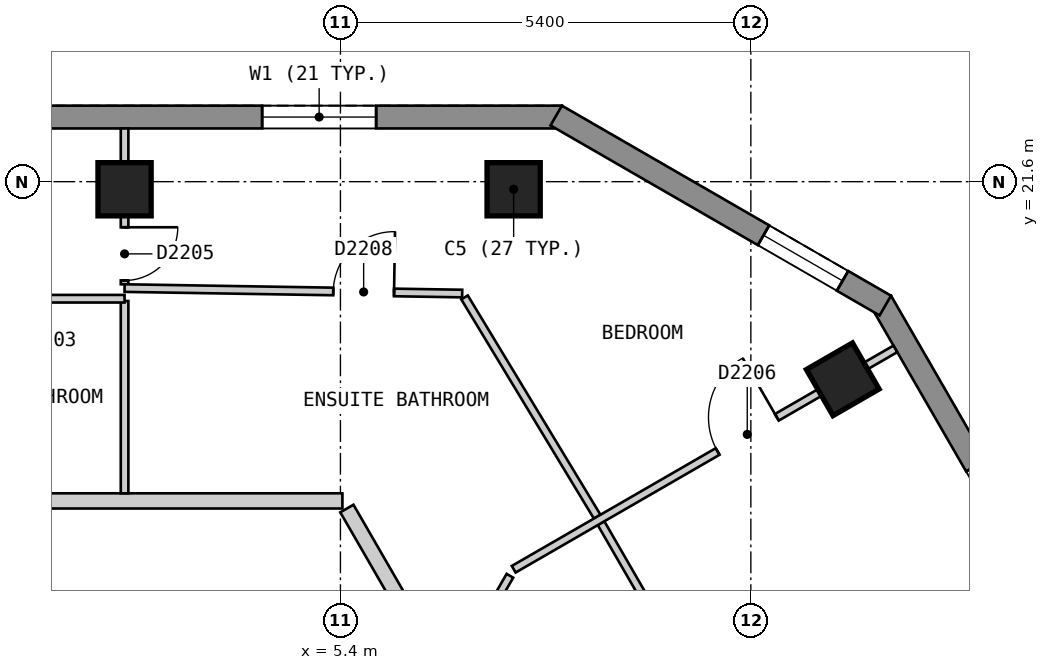
"""IFC4 building model, lengths in metres.
Left out: names, types, materials, properties, quantities, classifications, styles, units other than length and angle.
Written with IfcOpenShell. Run it as: python <this file> out.ifc"""

import sys

from ifc_helpers import new_model, si_unit, direction, frame, frame_2d, origin, origin_2d, place, context, subcontext, project, spatial, polyline, rectangle, outline, extrude, element, fill, save


model = new_model("IFC4")
c1 = context("Model", 3, precision=1e-05, world=origin(), true_north=direction((0.0, 1.0)))
c2 = subcontext(c1, "Body", "Model", "MODEL_VIEW")
j1 = project(units=[si_unit("LENGTHUNIT", "METRE"), si_unit("PLANEANGLEUNIT", "RADIAN")], contexts=[c1])
p1 = place(None, origin())
s1 = spatial("IfcSite", under=j1, at=p1, CompositionType="ELEMENT")
p2 = place(p1, origin())
s2 = spatial("IfcBuilding", under=s1, at=p2, CompositionType="ELEMENT")
p3 = place(p2, frame((0.0, 0.0, 235.8)))
s3 = spatial("IfcBuildingStorey", under=s2, at=p3, CompositionType="ELEMENT", Elevation=235.8)
for number, where, z_axis, x_axis in (
    (1, (7.679, 21.5, 0.0), (0.0, 0.0, 1.0), (-1.0, 0.0, 0.0)),
    (2, (2.56, 21.5, 0.0), (0.0, 0.0, 1.0), (-1.0, 0.0, 0.0)),
    (3, (12.009, 19.0, 0.0), (0.0, 0.0, 1.0), (-0.5, 0.866, 0.0)),
):
    element("IfcColumn", number, at=place(p3, frame(where, z_axis=z_axis, x_axis=x_axis)), inside=s3, PredefinedType="COLUMN", context=c2, shape_type="SweptSolid", body=[
        extrude(rectangle(XDim=0.7, YDim=0.7, at=origin_2d()), origin(), (0.0, 0.0, 1.0), 3.0),
    ])
p4 = place(p3, frame((8.314, 22.45, 0.0), z_axis=(0.0, 0.0, 1.0), x_axis=(-1.0, 0.0, 0.0)))
e4 = element("IfcWall", 4, at=p4, inside=s3, PredefinedType="SOLIDWALL", context=c2, shape_type="SweptSolid", body=[
    extrude(outline(polyline([(0.0, -0.15), (16.628, -0.15), (16.548, 0.15), (0.08, 0.15), (0.0, -0.15)])), origin(), (0.0, 0.0, 1.0), 2.7),
])
p5 = place(p4, frame((2.444, 0.0, 0.15)))
e5 = element("IfcOpeningElement", 5, at=p5, cuts=e4, PredefinedType="OPENING", context=c2, shape_type="SweptSolid", body=[
    extrude(rectangle(XDim=1.5, YDim=2.1, at=frame_2d((0.75, 1.05))), frame((0.0, 0.16, 0.0), z_axis=(0.0, -1.0, 0.0), x_axis=(1.0, 0.0, 0.0)), (0.0, 0.0, 1.0), 0.32),
])
p6 = place(p4, frame((7.564, 0.0, 0.15)))
e6 = element("IfcOpeningElement", 6, at=p6, cuts=e4, PredefinedType="OPENING", context=c2, shape_type="SweptSolid", body=[
    extrude(rectangle(XDim=1.5, YDim=2.1, at=frame_2d((0.75, 1.05))), frame((0.0, 0.16, 0.0), z_axis=(0.0, -1.0, 0.0), x_axis=(1.0, 0.0, 0.0)), (0.0, 0.0, 1.0), 0.32),
])
p7 = place(p4, frame((12.683, 0.0, 0.15)))
e7 = element("IfcOpeningElement", 7, at=p7, cuts=e4, PredefinedType="OPENING", context=c2, shape_type="SweptSolid", body=[
    extrude(rectangle(XDim=1.5, YDim=2.1, at=frame_2d((0.75, 1.05))), frame((0.0, 0.16, 0.0), z_axis=(0.0, -1.0, 0.0), x_axis=(1.0, 0.0, 0.0)), (0.0, 0.0, 1.0), 0.32),
])
p8 = place(p3, frame((23.599, 0.825, 0.0), z_axis=(0.0, 0.0, 1.0), x_axis=(-0.500003656944, 0.866023292436, 0.0)))
e8 = element("IfcWall", 8, at=p8, inside=s3, PredefinedType="SOLIDWALL", context=c2, shape_type="SweptSolid", body=[
    extrude(outline(polyline([(0.0, -0.15), (22.17, -0.15), (22.09, 0.15), (0.08, 0.15), (0.0, -0.15)])), origin(), (0.0, 0.0, 1.0), 2.7),
])
p9 = place(p8, frame((2.497, 0.0, 0.15)))
e9 = element("IfcOpeningElement", 9, at=p9, cuts=e8, PredefinedType="OPENING", context=c2, shape_type="SweptSolid", body=[
    extrude(rectangle(XDim=1.5, YDim=2.1, at=frame_2d((0.75, 1.05))), frame((0.0, 0.16, 0.0), z_axis=(0.0, -1.0, 0.0), x_axis=(1.0, 0.0, 0.0)), (0.0, 0.0, 1.0), 0.32),
])
p10 = place(p8, frame((7.723, 0.0, 0.15)))
e10 = element("IfcOpeningElement", 10, at=p10, cuts=e8, PredefinedType="OPENING", context=c2, shape_type="SweptSolid", body=[
    extrude(rectangle(XDim=1.5, YDim=2.1, at=frame_2d((0.75, 1.05))), frame((0.0, 0.16, 0.0), z_axis=(0.0, -1.0, 0.0), x_axis=(1.0, 0.0, 0.0)), (0.0, 0.0, 1.0), 0.32),
])
p11 = place(p8, frame((12.948, 0.0, 0.15)))
e11 = element("IfcOpeningElement", 11, at=p11, cuts=e8, PredefinedType="OPENING", context=c2, shape_type="SweptSolid", body=[
    extrude(rectangle(XDim=1.5, YDim=2.1, at=frame_2d((0.75, 1.05))), frame((0.0, 0.16, 0.0), z_axis=(0.0, -1.0, 0.0), x_axis=(1.0, 0.0, 0.0)), (0.0, 0.0, 1.0), 0.32),
])
p12 = place(p8, frame((18.173, 0.0, 0.15)))
e12 = element("IfcOpeningElement", 12, at=p12, cuts=e8, PredefinedType="OPENING", context=c2, shape_type="SweptSolid", body=[
    extrude(rectangle(XDim=1.5, YDim=2.1, at=frame_2d((0.75, 1.05))), frame((0.0, 0.16, 0.0), z_axis=(0.0, -1.0, 0.0), x_axis=(1.0, 0.0, 0.0)), (0.0, 0.0, 1.0), 0.32),
])
p13 = place(p3, frame((12.569, 19.97, 0.0), z_axis=(0.0, 0.0, 1.0), x_axis=(-0.866022959057, 0.500004234368, 0.0)))
e13 = element("IfcWall", 13, at=p13, inside=s3, PredefinedType="SOLIDWALL", context=c2, shape_type="SweptSolid", body=[
    extrude(outline(polyline([(0.0, -0.15), (5.0, -0.15), (4.92, 0.15), (0.08, 0.15), (0.0, -0.15)])), origin(), (0.0, 0.0, 1.0), 2.7),
])
p14 = place(p13, frame((0.65, 0.0, 0.15)))
e14 = element("IfcOpeningElement", 14, at=p14, cuts=e13, PredefinedType="OPENING", context=c2, shape_type="SweptSolid", body=[
    extrude(rectangle(XDim=1.2, YDim=2.1, at=frame_2d((0.6, 1.05))), frame((0.0, 0.16, 0.0), z_axis=(0.0, -1.0, 0.0), x_axis=(1.0, 0.0, 0.0)), (0.0, 0.0, 1.0), 0.32),
])
p15 = place(p3, frame((5.485, 17.3, 0.0), z_axis=(0.0, 0.0, 1.0), x_axis=(0.500017221754, -0.866015460572, 0.0)))
e15 = element("IfcWall", 15, at=p15, inside=s3, PredefinedType="PARTITIONING", context=c2, shape_type="SweptSolid", body=[
    extrude(rectangle(XDim=10.468, YDim=0.2, at=frame_2d((5.234, 0.0))), origin(), (0.0, 0.0, 1.0), 2.7),
])
p16 = place(p15, frame((9.092, 0.0, 0.0)))
e16 = element("IfcOpeningElement", 16, at=p16, cuts=e15, PredefinedType="OPENING", context=c2, shape_type="SweptSolid", body=[
    extrude(rectangle(XDim=1.0, YDim=2.1, at=frame_2d((0.5, 1.05))), frame((0.0, 0.11, 0.0), z_axis=(0.0, -1.0, 0.0), x_axis=(1.0, 0.0, 0.0)), (0.0, 0.0, 1.0), 0.22),
])
p17 = place(p3, frame((-5.311, 17.4, 0.0), z_axis=(0.0, 0.0, 1.0), x_axis=(1.0, 0.0, 0.0)))
e17 = element("IfcWall", 17, at=p17, inside=s3, PredefinedType="PARTITIONING", context=c2, shape_type="SweptSolid", body=[
    extrude(rectangle(XDim=10.737, YDim=0.2, at=frame_2d((5.369, 0.0))), origin(), (0.0, 0.0, 1.0), 2.7),
])
p18 = place(p17, frame((4.812, 0.0, 0.0)))
e18 = element("IfcOpeningElement", 18, at=p18, cuts=e17, PredefinedType="OPENING", context=c2, shape_type="SweptSolid", body=[
    extrude(rectangle(XDim=1.0, YDim=2.1, at=frame_2d((0.5, 1.05))), frame((0.0, 0.11, 0.0), z_axis=(0.0, -1.0, 0.0), x_axis=(1.0, 0.0, 0.0)), (0.0, 0.0, 1.0), 0.22),
])
p19 = place(p3, frame((7.033, 20.077, 0.0), z_axis=(0.0, 0.0, 1.0), x_axis=(0.517730137343, -0.855543981854, 0.0)))
e19 = element("IfcWall", 19, at=p19, inside=s3, PredefinedType="PARTITIONING", context=c2, shape_type="SweptSolid", body=[
    extrude(rectangle(XDim=3.371, YDim=0.1, at=frame_2d((1.685, 0.0))), origin(), (0.0, 0.0, 1.0), 2.7),
])
p20 = place(p3, frame((8.829, 17.107, 0.0), z_axis=(0.0, 0.0, 1.0), x_axis=(0.500035512416, -0.866004899711, 0.0)))
e20 = element("IfcWall", 20, at=p20, inside=s3, PredefinedType="PARTITIONING", context=c2, shape_type="SweptSolid", body=[
    extrude(rectangle(XDim=5.175, YDim=0.1, at=frame_2d((2.588, 0.0))), origin(), (0.0, 0.0, 1.0), 2.7),
])
p21 = place(p20, frame((2.163, 0.0, 0.0)))
e21 = element("IfcOpeningElement", 21, at=p21, cuts=e20, PredefinedType="OPENING", context=c2, shape_type="SweptSolid", body=[
    extrude(rectangle(XDim=0.8, YDim=2.1, at=frame_2d((0.4, 1.05))), frame((0.0, 0.06, 0.0), z_axis=(0.0, -1.0, 0.0), x_axis=(1.0, 0.0, 0.0)), (0.0, 0.0, 1.0), 0.12),
])
p22 = place(p3, frame((2.56, 22.3, 0.0), z_axis=(0.0, 0.0, 1.0), x_axis=(0.0, -1.0, 0.0)))
e22 = element("IfcWall", 22, at=p22, inside=s3, PredefinedType="PARTITIONING", context=c2, shape_type="SweptSolid", body=[
    extrude(rectangle(XDim=2.05, YDim=0.1, at=frame_2d((1.025, 0.0))), origin(), (0.0, 0.0, 1.0), 2.7),
])
p23 = place(p22, frame((1.3, 0.0, 0.0)))
e23 = element("IfcOpeningElement", 23, at=p23, cuts=e22, PredefinedType="OPENING", context=c2, shape_type="SweptSolid", body=[
    extrude(rectangle(XDim=0.7, YDim=2.1, at=frame_2d((0.35, 1.05))), frame((0.0, 0.06, 0.0), z_axis=(0.0, -1.0, 0.0), x_axis=(1.0, 0.0, 0.0)), (0.0, 0.0, 1.0), 0.12),
])
p24 = place(p3, frame((2.56, 20.03, 0.0), z_axis=(0.0, 0.0, 1.0), x_axis=(0.0, -1.0, 0.0)))
e24 = element("IfcWall", 24, at=p24, inside=s3, PredefinedType="PARTITIONING", context=c2, shape_type="SweptSolid", body=[
    extrude(rectangle(XDim=2.53, YDim=0.1, at=frame_2d((1.265, 0.0))), origin(), (0.0, 0.0, 1.0), 2.7),
])
p25 = place(p3, frame((2.56, 20.2, 0.0), z_axis=(0.0, 0.0, 1.0), x_axis=(0.999868576801, -0.016212005615, 0.0)))
e25 = element("IfcWall", 25, at=p25, inside=s3, PredefinedType="PARTITIONING", context=c2, shape_type="SweptSolid", body=[
    extrude(rectangle(XDim=4.442, YDim=0.1, at=frame_2d((2.221, 0.0))), origin(), (0.0, 0.0, 1.0), 2.7),
])
p26 = place(p25, frame((2.746, 0.0, 0.0)))
e26 = element("IfcOpeningElement", 26, at=p26, cuts=e25, PredefinedType="OPENING", context=c2, shape_type="SweptSolid", body=[
    extrude(rectangle(XDim=0.8, YDim=2.1, at=frame_2d((0.4, 1.05))), frame((0.0, 0.06, 0.0), z_axis=(0.0, -1.0, 0.0), x_axis=(1.0, 0.0, 0.0)), (0.0, 0.0, 1.0), 0.12),
])
p27 = place(p3, frame((-0.716, 20.06, 0.0), z_axis=(0.0, 0.0, 1.0), x_axis=(1.0, 0.0, 0.0)))
e27 = element("IfcWall", 27, at=p27, inside=s3, PredefinedType="PARTITIONING", context=c2, shape_type="SweptSolid", body=[
    extrude(rectangle(XDim=3.276, YDim=0.1, at=frame_2d((1.638, 0.0))), origin(), (0.0, 0.0, 1.0), 2.7),
])
p28 = place(p3, frame((6.871, 15.1, 0.0), z_axis=(0.0, 0.0, 1.0), x_axis=(0.499805980977, 0.866137391745, 0.0)))
e28 = element("IfcWall", 28, at=p28, inside=s3, PredefinedType="PARTITIONING", context=c2, shape_type="SweptSolid", body=[
    extrude(rectangle(XDim=1.518, YDim=0.1, at=frame_2d((0.759, 0.0))), origin(), (0.0, 0.0, 1.0), 2.7),
])
p29 = place(p3, frame((7.68, 16.501, 0.0), z_axis=(0.0, 0.0, 1.0), x_axis=(0.86602149507, 0.500006770031, 0.0)))
e29 = element("IfcWall", 29, at=p29, inside=s3, PredefinedType="PARTITIONING", context=c2, shape_type="SweptSolid", body=[
    extrude(rectangle(XDim=5.798, YDim=0.1, at=frame_2d((2.899, 0.0))), origin(), (0.0, 0.0, 1.0), 2.7),
])
p30 = place(p29, frame((3.098, 0.0, 0.0)))
e30 = element("IfcOpeningElement", 30, at=p30, cuts=e29, PredefinedType="OPENING", context=c2, shape_type="SweptSolid", body=[
    extrude(rectangle(XDim=0.9, YDim=2.1, at=frame_2d((0.45, 1.05))), frame((0.0, 0.06, 0.0), z_axis=(0.0, -1.0, 0.0), x_axis=(1.0, 0.0, 0.0)), (0.0, 0.0, 1.0), 0.12),
])
p31 = place(p5, origin())
e31 = element("IfcWindow", 31, at=p31, inside=s3, PartitioningType="SINGLE_PANEL", PredefinedType="WINDOW", context=c2, shape_type="SweptSolid", body=[
    extrude(rectangle(XDim=1.5, YDim=2.1, at=frame_2d((0.75, 1.05))), frame((0.0, 0.03, 0.0), z_axis=(0.0, -1.0, 0.0), x_axis=(1.0, 0.0, 0.0)), (0.0, 0.0, 1.0), 0.06),
])
fill(e5, e31)
p32 = place(p14, origin())
e32 = element("IfcWindow", 32, at=p32, inside=s3, PartitioningType="SINGLE_PANEL", PredefinedType="WINDOW", context=c2, shape_type="SweptSolid", body=[
    extrude(rectangle(XDim=1.2, YDim=2.1, at=frame_2d((0.6, 1.05))), frame((0.0, 0.03, 0.0), z_axis=(0.0, -1.0, 0.0), x_axis=(1.0, 0.0, 0.0)), (0.0, 0.0, 1.0), 0.06),
])
fill(e14, e32)
p33 = place(p23, origin())
e33 = element("IfcDoor", 33, at=p33, inside=s3, OperationType="SINGLE_SWING_LEFT", PredefinedType="DOOR", context=c2, shape_type="SweptSolid", body=[
    extrude(rectangle(XDim=0.7, YDim=2.1, at=frame_2d((0.35, 1.05))), frame((0.0, 0.025, 0.0), z_axis=(0.0, -1.0, 0.0), x_axis=(1.0, 0.0, 0.0)), (0.0, 0.0, 1.0), 0.05),
])
fill(e23, e33)
p34 = place(p30, origin())
e34 = element("IfcDoor", 34, at=p34, inside=s3, OperationType="SINGLE_SWING_RIGHT", PredefinedType="DOOR", context=c2, shape_type="SweptSolid", body=[
    extrude(rectangle(XDim=0.9, YDim=2.1, at=frame_2d((0.45, 1.05))), frame((0.0, 0.025, 0.0), z_axis=(0.0, -1.0, 0.0), x_axis=(1.0, 0.0, 0.0)), (0.0, 0.0, 1.0), 0.05),
])
fill(e30, e34)
p35 = place(p26, origin())
e35 = element("IfcDoor", 35, at=p35, inside=s3, OperationType="SINGLE_SWING_RIGHT", PredefinedType="DOOR", context=c2, shape_type="SweptSolid", body=[
    extrude(rectangle(XDim=0.8, YDim=2.1, at=frame_2d((0.4, 1.05))), frame((0.0, 0.025, 0.0), z_axis=(0.0, -1.0, 0.0), x_axis=(1.0, 0.0, 0.0)), (0.0, 0.0, 1.0), 0.05),
])
fill(e26, e35)
save(model, sys.argv[1])
